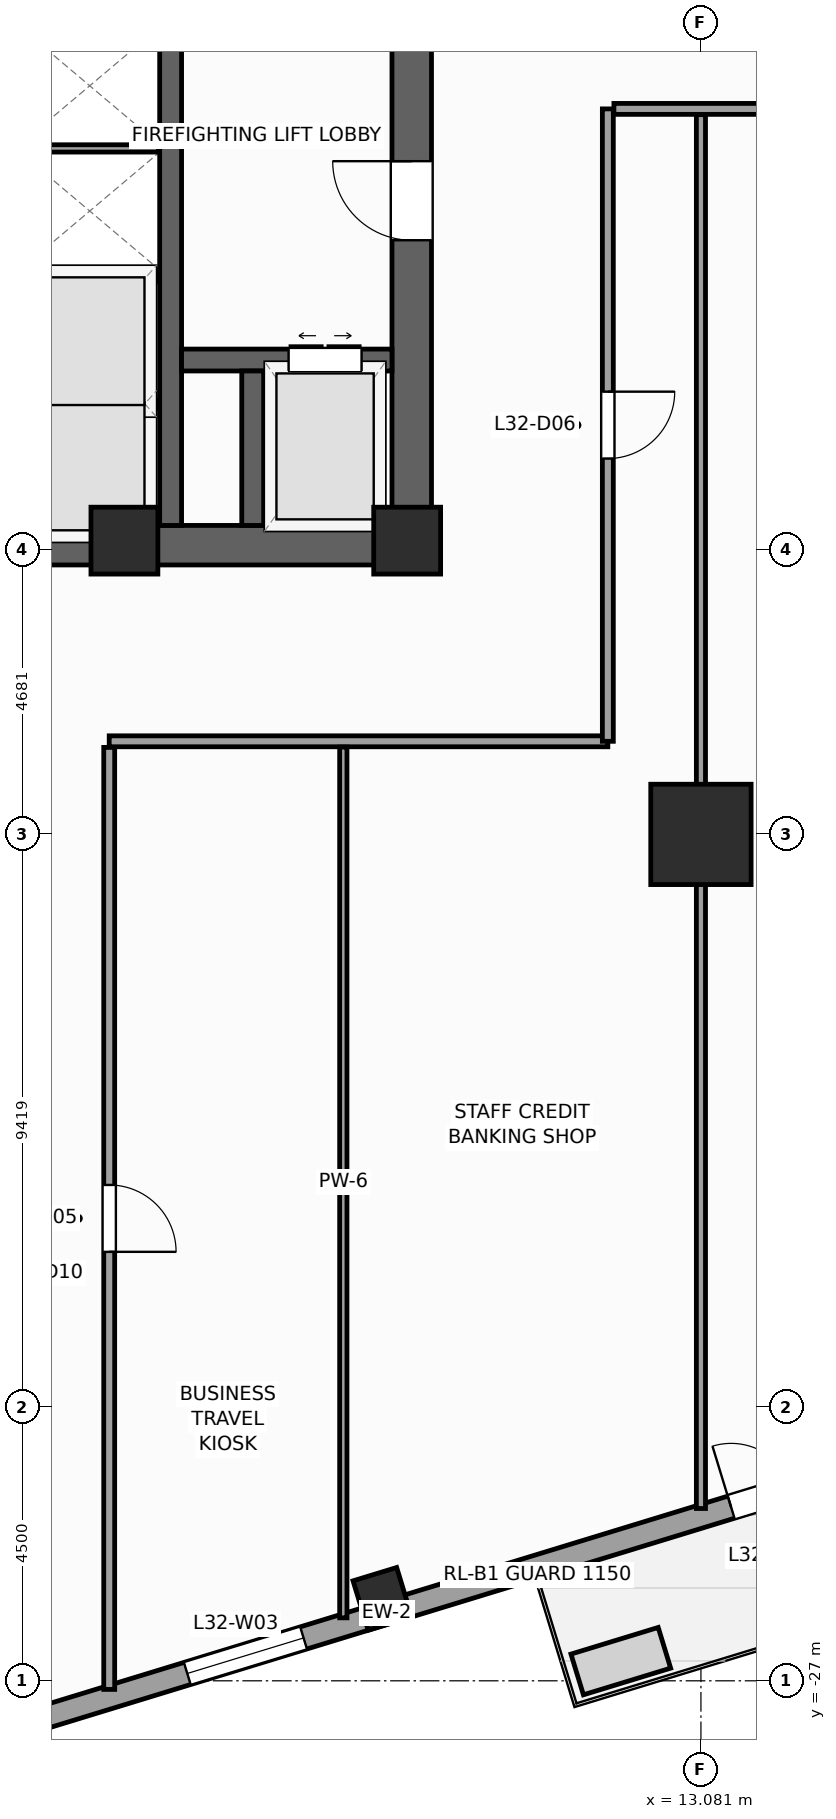
"""IFC4 building model, lengths in metres.
Left out: names, types, materials, properties, quantities, classifications, styles, units other than length and angle.
Written with IfcOpenShell. Run it as: python <this file> out.ifc"""

import sys

from ifc_helpers import new_model, si_unit, direction, frame, frame_2d, origin, origin_2d, place, context, subcontext, project, spatial, rectangle, extrude, source, transform, mapped, element, fill, save


model = new_model("IFC4")
c1 = context("Model", 3, precision=1e-05, world=origin(), true_north=direction((0.0, 1.0)))
c2 = subcontext(c1, "Body", "Model", "MODEL_VIEW")
j1 = project(units=[si_unit("LENGTHUNIT", "METRE"), si_unit("PLANEANGLEUNIT", "RADIAN")], contexts=[c1])
p1 = place(None, origin())
s1 = spatial("IfcSite", under=j1, at=p1, CompositionType="ELEMENT")
p2 = place(p1, origin())
s2 = spatial("IfcBuilding", under=s1, at=p2, CompositionType="ELEMENT")
p3 = place(p2, frame((0.0, 0.0, 135.2)))
s3 = spatial("IfcBuildingStorey", under=s2, at=p3, CompositionType="ELEMENT", Elevation=135.2)
p4 = place(p3, frame((-8.65, -8.325, 0.0), z_axis=(0.0, 0.0, 1.0), x_axis=(1.0, 0.0, 0.0)))
e1 = element("IfcWall", 1, at=p4, inside=s3, PredefinedType="SHEAR", context=c2, shape_type="SweptSolid", body=[
    extrude(rectangle(XDim=17.3, YDim=0.65, at=frame_2d((8.65, 0.0))), origin(), (0.0, 0.0, 1.0), 4.0),
])
p5 = place(p4, frame((8.0, 0.0, 0.0)))
e2 = element("IfcOpeningElement", 2, at=p5, cuts=e1, PredefinedType="OPENING", context=c2, shape_type="SweptSolid", body=[
    extrude(rectangle(XDim=1.3, YDim=2.2, at=frame_2d((0.65, 1.1))), frame((0.0, 0.335, 0.0), z_axis=(0.0, -1.0, 0.0), x_axis=(1.0, 0.0, 0.0)), (0.0, 0.0, 1.0), 0.67),
])
p6 = place(p3, frame((8.325, -8.0, 0.0), z_axis=(0.0, 0.0, 1.0), x_axis=(0.0, 1.0, 0.0)))
e3 = element("IfcWall", 3, at=p6, inside=s3, PredefinedType="SHEAR", context=c2, shape_type="SweptSolid", body=[
    extrude(rectangle(XDim=16.0, YDim=0.65, at=frame_2d((8.0, 0.0))), origin(), (0.0, 0.0, 1.0), 4.0),
])
p7 = place(p6, frame((4.69, 0.0, 0.0)))
e4 = element("IfcOpeningElement", 4, at=p7, cuts=e3, PredefinedType="OPENING", context=c2, shape_type="SweptSolid", body=[
    extrude(rectangle(XDim=1.3, YDim=2.2, at=frame_2d((0.65, 1.1))), frame((0.0, 0.335, 0.0), z_axis=(0.0, -1.0, 0.0), x_axis=(1.0, 0.0, 0.0)), (0.0, 0.0, 1.0), 0.67),
])
p8 = place(p3, frame((4.36, -8.0, 0.0), z_axis=(0.0, 0.0, 1.0), x_axis=(0.0, 1.0, 0.0)))
e5 = element("IfcWall", 5, at=p8, inside=s3, PredefinedType="SHEAR", context=c2, shape_type="SweptSolid", body=[
    extrude(rectangle(XDim=16.0, YDim=0.36, at=frame_2d((8.0, 0.0))), origin(), (0.0, 0.0, 1.0), 4.0),
])
p9 = place(p3, frame((4.54, -5.28, 0.0), z_axis=(0.0, 0.0, 1.0), x_axis=(1.0, 0.0, 0.0)))
e6 = element("IfcWall", 6, at=p9, inside=s3, PredefinedType="SHEAR", context=c2, shape_type="SweptSolid", body=[
    extrude(rectangle(XDim=3.46, YDim=0.36, at=frame_2d((1.73, 0.0))), origin(), (0.0, 0.0, 1.0), 4.0),
])
p10 = place(p9, frame((1.76, 0.0, 0.0)))
e7 = element("IfcOpeningElement", 7, at=p10, cuts=e6, PredefinedType="OPENING", context=c2, shape_type="SweptSolid", body=[
    extrude(rectangle(XDim=1.2, YDim=2.25, at=frame_2d((0.6, 1.125))), frame((0.0, 0.19, 0.0), z_axis=(0.0, -1.0, 0.0), x_axis=(1.0, 0.0, 0.0)), (0.0, 0.0, 1.0), 0.38),
])
p11 = place(p3, frame((5.71, -8.0, 0.0), z_axis=(0.0, 0.0, 1.0), x_axis=(0.0, 1.0, 0.0)))
e8 = element("IfcWall", 8, at=p11, inside=s3, PredefinedType="SHEAR", context=c2, shape_type="SweptSolid", body=[
    extrude(rectangle(XDim=2.54, YDim=0.36, at=frame_2d((1.27, 0.0))), origin(), (0.0, 0.0, 1.0), 4.0),
])
m1 = source(origin(), c2, "Body", "SweptSolid", [
    extrude(rectangle(XDim=1.1, YDim=1.1, at=origin_2d()), origin(), (0.0, 0.0, 1.0), 4.0),
])
for number, where, z_axis, x_axis in (
    (9, (8.25, -8.25, 0.0), (0.0, 0.0, 1.0), (1.0, 0.0, 0.0)),
    (10, (3.6, -8.25, 0.0), (0.0, 0.0, 1.0), (1.0, 0.0, 0.0)),
):
    element("IfcColumn", number, at=place(p3, frame(where, z_axis=z_axis, x_axis=x_axis)), inside=s3, PredefinedType="PILASTER", context=c2, shape_type="MappedRepresentation", body=[
        mapped(m1, transform((0.0, 0.0, 0.0), scale=1.0)),
    ])
m2 = source(origin(), c2, "Body", "SweptSolid", [
    extrude(rectangle(XDim=1.65, YDim=1.65, at=origin_2d()), origin(), (0.0, 0.0, 1.0), 4.0),
])
p12 = place(p3, frame((13.081, -13.081, 0.0), z_axis=(0.0, 0.0, 1.0), x_axis=(1.0, 0.0, 0.0)))
e11 = element("IfcColumn", 11, at=p12, inside=s3, PredefinedType="COLUMN", context=c2, shape_type="MappedRepresentation", body=[
    mapped(m2, transform((0.0, 0.0, 0.0), scale=1.0)),
])
m3 = source(origin(), c2, "Body", "SweptSolid", [
    extrude(rectangle(XDim=0.75, YDim=0.85, at=origin_2d()), origin(), (0.0, 0.0, 1.0), 4.0),
])
p13 = place(p3, frame((7.843, -25.653, 0.0), z_axis=(0.0, 0.0, 1.0), x_axis=(0.956304755963, 0.292371704723, 0.0)))
e12 = element("IfcColumn", 12, at=p13, inside=s3, PredefinedType="COLUMN", context=c2, shape_type="MappedRepresentation", body=[
    mapped(m3, transform((0.0, 0.0, 0.0), scale=1.0)),
])
p14 = place(p3, frame((-14.265, -32.658, 0.0), z_axis=(0.0, 0.0, 1.0), x_axis=(0.956304320851, 0.292373127906, 0.0)))
e13 = element("IfcWall", 13, at=p14, inside=s3, PredefinedType="STANDARD", context=c2, shape_type="SweptSolid", body=[
    extrude(rectangle(XDim=46.38, YDim=0.38, at=frame_2d((23.19, 0.0))), origin(), (0.0, 0.0, 1.0), 2.2),
])
p15 = place(p14, frame((29.115, 0.0, 0.0)))
e14 = element("IfcOpeningElement", 14, at=p15, cuts=e13, PredefinedType="OPENING", context=c2, shape_type="SweptSolid", body=[
    extrude(rectangle(XDim=1.05, YDim=2.02, at=frame_2d((0.525, 1.01))), frame((0.0, 0.2, 0.0), z_axis=(0.0, -1.0, 0.0), x_axis=(1.0, 0.0, 0.0)), (0.0, 0.0, 1.0), 0.4),
])
p16 = place(p14, frame((4.566, 0.0, 0.67)))
e15 = element("IfcOpeningElement", 15, at=p16, cuts=e13, PredefinedType="OPENING", context=c2, shape_type="SweptSolid", body=[
    extrude(rectangle(XDim=2.0, YDim=1.45, at=frame_2d((1.0, 0.725))), frame((0.0, 0.2, 0.0), z_axis=(0.0, -1.0, 0.0), x_axis=(1.0, 0.0, 0.0)), (0.0, 0.0, 1.0), 0.4),
])
p17 = place(p14, frame((12.45, 0.0, 0.67)))
e16 = element("IfcOpeningElement", 16, at=p17, cuts=e13, PredefinedType="OPENING", context=c2, shape_type="SweptSolid", body=[
    extrude(rectangle(XDim=2.0, YDim=1.45, at=frame_2d((1.0, 0.725))), frame((0.0, 0.2, 0.0), z_axis=(0.0, -1.0, 0.0), x_axis=(1.0, 0.0, 0.0)), (0.0, 0.0, 1.0), 0.4),
])
p18 = place(p14, frame((19.762, 0.0, 0.67)))
e17 = element("IfcOpeningElement", 17, at=p18, cuts=e13, PredefinedType="OPENING", context=c2, shape_type="SweptSolid", body=[
    extrude(rectangle(XDim=2.0, YDim=1.45, at=frame_2d((1.0, 0.725))), frame((0.0, 0.2, 0.0), z_axis=(0.0, -1.0, 0.0), x_axis=(1.0, 0.0, 0.0)), (0.0, 0.0, 1.0), 0.4),
])
p19 = place(p14, frame((31.288, 0.0, 0.67)))
e18 = element("IfcOpeningElement", 18, at=p19, cuts=e13, PredefinedType="OPENING", context=c2, shape_type="SweptSolid", body=[
    extrude(rectangle(XDim=2.0, YDim=1.45, at=frame_2d((1.0, 0.725))), frame((0.0, 0.2, 0.0), z_axis=(0.0, -1.0, 0.0), x_axis=(1.0, 0.0, 0.0)), (0.0, 0.0, 1.0), 0.4),
])
p20 = place(p14, frame((38.887, 0.0, 0.67)))
e19 = element("IfcOpeningElement", 19, at=p20, cuts=e13, PredefinedType="OPENING", context=c2, shape_type="SweptSolid", body=[
    extrude(rectangle(XDim=2.0, YDim=1.45, at=frame_2d((1.0, 0.725))), frame((0.0, 0.2, 0.0), z_axis=(0.0, -1.0, 0.0), x_axis=(1.0, 0.0, 0.0)), (0.0, 0.0, 1.0), 0.4),
])
p21 = place(p3, frame((1.89, -3.9, 0.0), z_axis=(0.0, 0.0, 1.0), x_axis=(1.0, 0.0, 0.0)))
e20 = element("IfcWall", 20, at=p21, inside=s3, PredefinedType="PARTITIONING", context=c2, shape_type="SweptSolid", body=[
    extrude(rectangle(XDim=2.28, YDim=0.18, at=frame_2d((1.14, 0.0))), origin(), (0.0, 0.0, 1.0), 3.6),
])
for number, where, z_axis, x_axis in (
    (21, (1.9, -6.0, 0.0), (0.0, 0.0, 1.0), (1.0, 0.0, 0.0)),
    (22, (1.9, -1.8, 0.0), (0.0, 0.0, 1.0), (1.0, 0.0, 0.0)),
):
    element("IfcWall", number, at=place(p3, frame(where, z_axis=z_axis, x_axis=x_axis)), inside=s3, PredefinedType="PARTITIONING", context=c2, shape_type="SweptSolid", body=[
        extrude(rectangle(XDim=2.26, YDim=0.12, at=frame_2d((1.13, 0.0))), origin(), (0.0, 0.0, 1.0), 3.6),
    ])
p22 = place(p3, frame((3.35, -11.55, 0.0), z_axis=(0.0, 0.0, 1.0), x_axis=(1.0, 0.0, 0.0)))
e23 = element("IfcWall", 23, at=p22, inside=s3, PredefinedType="PARTITIONING", context=c2, shape_type="SweptSolid", body=[
    extrude(rectangle(XDim=8.2, YDim=0.18, at=frame_2d((4.1, 0.0))), origin(), (0.0, 0.0, 1.0), 3.6),
])
p23 = place(p3, frame((11.55, -11.55, 0.0), z_axis=(0.0, 0.0, 1.0), x_axis=(0.0, 1.0, 0.0)))
e24 = element("IfcWall", 24, at=p23, inside=s3, PredefinedType="PARTITIONING", context=c2, shape_type="SweptSolid", body=[
    extrude(rectangle(XDim=10.4, YDim=0.18, at=frame_2d((5.2, 0.0))), origin(), (0.0, 0.0, 1.0), 3.6),
])
p24 = place(p23, frame((4.65, 0.0, 0.0)))
e25 = element("IfcOpeningElement", 25, at=p24, cuts=e24, PredefinedType="OPENING", context=c2, shape_type="SweptSolid", body=[
    extrude(rectangle(XDim=1.1, YDim=2.2, at=frame_2d((0.55, 1.1))), frame((0.0, 0.1, 0.0), z_axis=(0.0, -1.0, 0.0), x_axis=(1.0, 0.0, 0.0)), (0.0, 0.0, 1.0), 0.2),
])
p25 = place(p3, frame((11.65, -1.15, 0.0), z_axis=(0.0, 0.0, 1.0), x_axis=(1.0, 0.0, 0.0)))
e26 = element("IfcWall", 26, at=p25, inside=s3, PredefinedType="PARTITIONING", context=c2, shape_type="SweptSolid", body=[
    extrude(rectangle(XDim=16.867, YDim=0.18, at=frame_2d((8.434, 0.0))), origin(), (0.0, 0.0, 1.0), 3.6),
])
p26 = place(p25, frame((8.435, 0.0, 0.0)))
e27 = element("IfcOpeningElement", 27, at=p26, cuts=e26, PredefinedType="OPENING", context=c2, shape_type="SweptSolid", body=[
    extrude(rectangle(XDim=1.1, YDim=2.2, at=frame_2d((0.55, 1.1))), frame((0.0, 0.1, 0.0), z_axis=(0.0, -1.0, 0.0), x_axis=(1.0, 0.0, 0.0)), (0.0, 0.0, 1.0), 0.2),
])
p27 = place(p3, frame((3.35, -27.142, 0.0), z_axis=(0.0, 0.0, 1.0), x_axis=(0.0, 1.0, 0.0)))
e28 = element("IfcWall", 28, at=p27, inside=s3, PredefinedType="PARTITIONING", context=c2, shape_type="SweptSolid", body=[
    extrude(rectangle(XDim=15.492, YDim=0.18, at=frame_2d((7.746, 0.0))), origin(), (0.0, 0.0, 1.0), 3.6),
])
p28 = place(p27, frame((7.196, 0.0, 0.0)))
e29 = element("IfcOpeningElement", 29, at=p28, cuts=e28, PredefinedType="OPENING", context=c2, shape_type="SweptSolid", body=[
    extrude(rectangle(XDim=1.1, YDim=2.2, at=frame_2d((0.55, 1.1))), frame((0.0, 0.1, 0.0), z_axis=(0.0, -1.0, 0.0), x_axis=(1.0, 0.0, 0.0)), (0.0, 0.0, 1.0), 0.2),
])
p29 = place(p3, frame((7.2, -25.964, 0.0), z_axis=(0.0, 0.0, 1.0), x_axis=(0.0, 1.0, 0.0)))
e30 = element("IfcWall", 30, at=p29, inside=s3, PredefinedType="PARTITIONING", context=c2, shape_type="SweptSolid", body=[
    extrude(rectangle(XDim=14.319, YDim=0.12, at=frame_2d((7.16, 0.0))), origin(), (0.0, 0.0, 1.0), 3.6),
])
p30 = place(p3, frame((13.081, -24.167, 0.0), z_axis=(0.0, 0.0, 1.0), x_axis=(0.0, 1.0, 0.0)))
e31 = element("IfcWall", 31, at=p30, inside=s3, PredefinedType="PARTITIONING", context=c2, shape_type="SweptSolid", body=[
    extrude(rectangle(XDim=22.921, YDim=0.15, at=frame_2d((11.461, 0.0))), origin(), (0.0, 0.0, 1.0), 2.2),
])
m4 = source(origin(), c2, "Body", "SweptSolid", [
    extrude(rectangle(XDim=1.05, YDim=2.02, at=frame_2d((0.525, 1.01))), frame((0.0, 0.025, 0.0), z_axis=(0.0, -1.0, 0.0), x_axis=(1.0, 0.0, 0.0)), (0.0, 0.0, 1.0), 0.05),
])
p31 = place(p15, origin())
e32 = element("IfcDoor", 32, at=p31, inside=s3, OperationType="SINGLE_SWING_LEFT", PredefinedType="DOOR", context=c2, shape_type="MappedRepresentation", body=[
    mapped(m4, transform((0.0, 0.0, 0.0), scale=1.0)),
])
fill(e14, e32)
m5 = source(origin(), c2, "Body", "SweptSolid", [
    extrude(rectangle(XDim=2.0, YDim=1.45, at=frame_2d((1.0, 0.725))), frame((0.0, 0.03, 0.0), z_axis=(0.0, -1.0, 0.0), x_axis=(1.0, 0.0, 0.0)), (0.0, 0.0, 1.0), 0.06),
])
p32 = place(p18, origin())
e33 = element("IfcWindow", 33, at=p32, inside=s3, PartitioningType="SINGLE_PANEL", PredefinedType="WINDOW", context=c2, shape_type="MappedRepresentation", body=[
    mapped(m5, transform((0.0, 0.0, 0.0), scale=1.0)),
])
fill(e17, e33)
m6 = source(origin(), c2, "Body", "SweptSolid", [
    extrude(rectangle(XDim=1.3, YDim=2.2, at=frame_2d((0.65, 1.1))), frame((0.0, 0.025, 0.0), z_axis=(0.0, -1.0, 0.0), x_axis=(1.0, 0.0, 0.0)), (0.0, 0.0, 1.0), 0.05),
])
p33 = place(p7, origin())
e34 = element("IfcDoor", 34, at=p33, inside=s3, OperationType="SINGLE_SWING_RIGHT", PredefinedType="DOOR", context=c2, shape_type="MappedRepresentation", body=[
    mapped(m6, transform((0.0, 0.0, 0.0), scale=1.0)),
])
fill(e4, e34)
m7 = source(origin(), c2, "Body", "SweptSolid", [
    extrude(rectangle(XDim=1.2, YDim=2.25, at=frame_2d((0.6, 1.125))), frame((0.0, 0.025, 0.0), z_axis=(0.0, -1.0, 0.0), x_axis=(1.0, 0.0, 0.0)), (0.0, 0.0, 1.0), 0.05),
])
p34 = place(p10, origin())
e35 = element("IfcDoor", 35, at=p34, inside=s3, OperationType="DOUBLE_DOOR_SLIDING", PredefinedType="DOOR", context=c2, shape_type="MappedRepresentation", body=[
    mapped(m7, transform((0.0, 0.0, 0.0), scale=1.0)),
])
fill(e7, e35)
m8 = source(origin(), c2, "Body", "SweptSolid", [
    extrude(rectangle(XDim=1.1, YDim=2.2, at=frame_2d((0.55, 1.1))), frame((0.0, 0.025, 0.0), z_axis=(0.0, -1.0, 0.0), x_axis=(1.0, 0.0, 0.0)), (0.0, 0.0, 1.0), 0.05),
])
p35 = place(p28, frame((1.1, 0.0, 0.0), z_axis=(0.0, 0.0, 1.0), x_axis=(-1.0, 0.0, 0.0)))
e36 = element("IfcDoor", 36, at=p35, inside=s3, OperationType="SINGLE_SWING_LEFT", PredefinedType="DOOR", context=c2, shape_type="MappedRepresentation", body=[
    mapped(m8, transform((0.0, 0.0, 0.0), scale=1.0)),
])
fill(e29, e36)
p36 = place(p24, frame((1.1, 0.0, 0.0), z_axis=(0.0, 0.0, 1.0), x_axis=(-1.0, 0.0, 0.0)))
e37 = element("IfcDoor", 37, at=p36, inside=s3, OperationType="SINGLE_SWING_RIGHT", PredefinedType="DOOR", context=c2, shape_type="MappedRepresentation", body=[
    mapped(m8, transform((0.0, 0.0, 0.0), scale=1.0)),
])
fill(e25, e37)
save(model, sys.argv[1])
